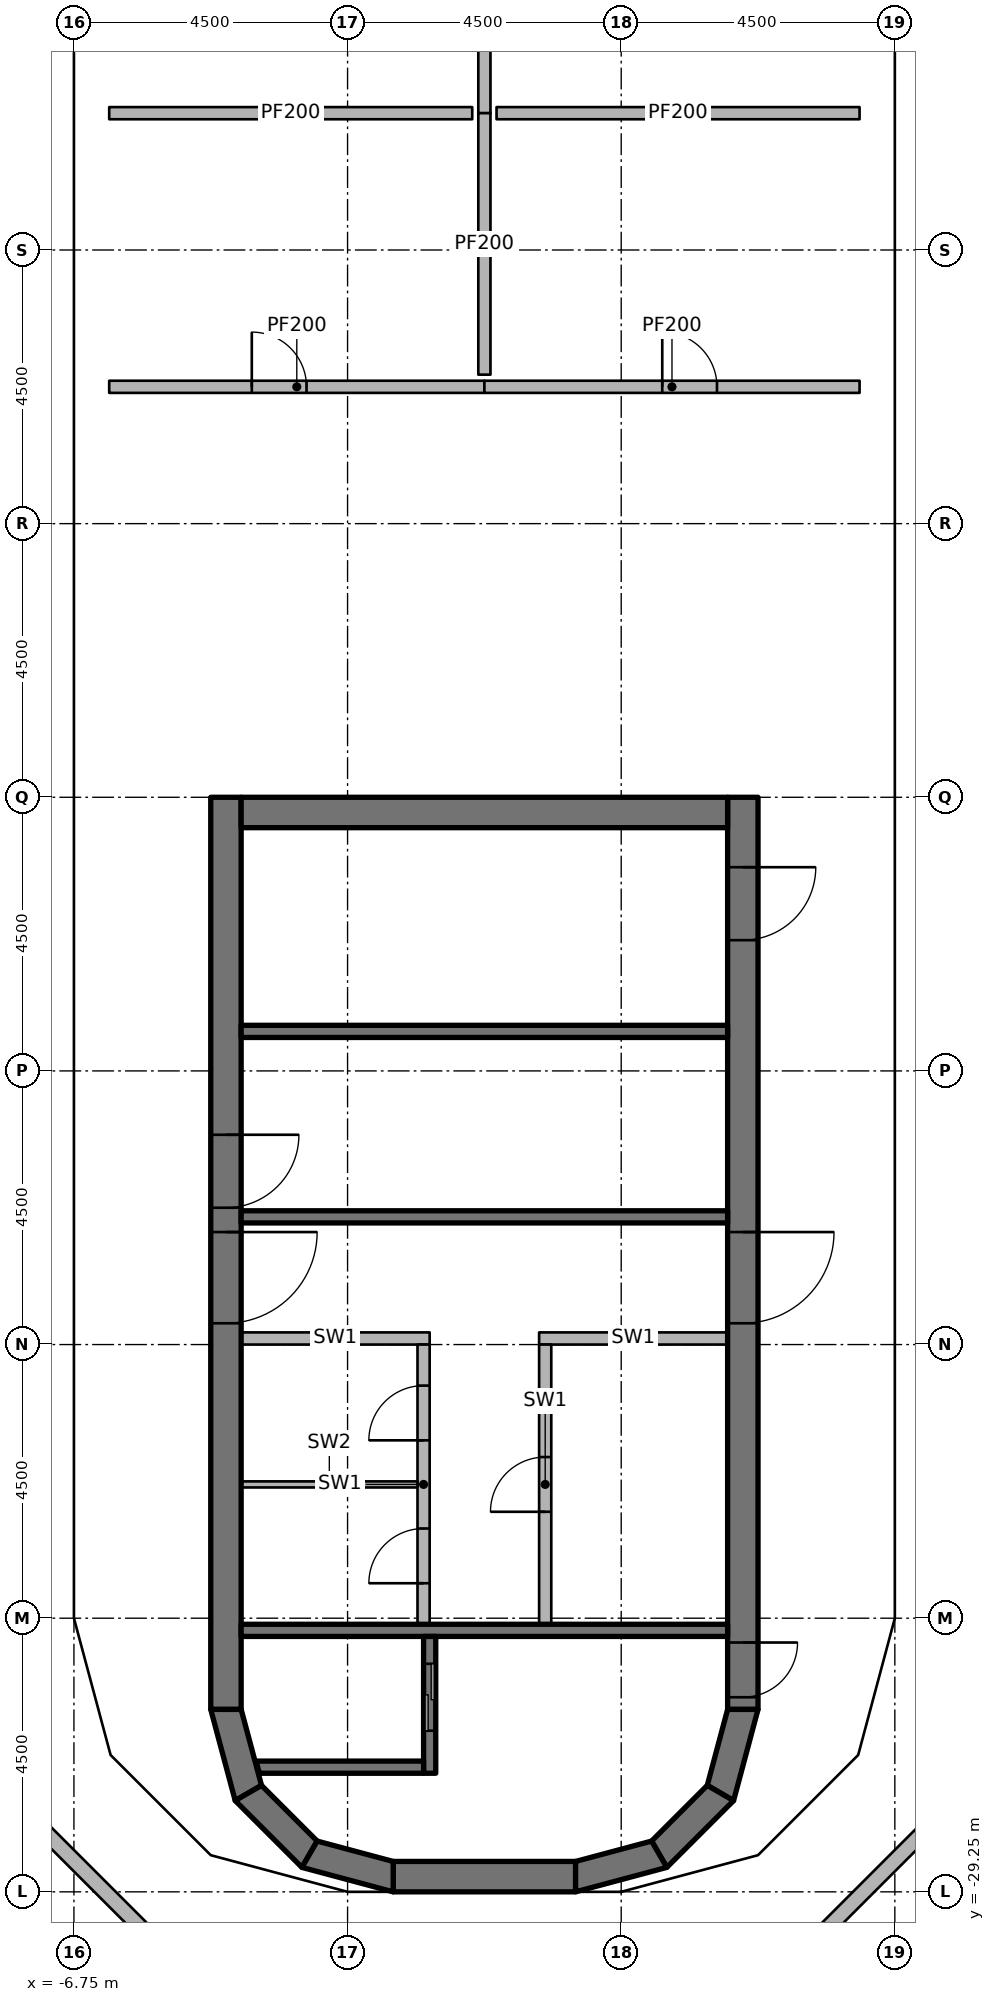
"""IFC4 building model, lengths in metres.
Left out: names, types, materials, properties, quantities, classifications, styles, units other than length and angle.
Written with IfcOpenShell. Run it as: python <this file> out.ifc"""

import sys

from ifc_helpers import new_model, si_unit, direction, frame, frame_2d, origin, origin_2d, place, context, subcontext, project, spatial, polyline, rectangle, outline, extrude, element, fill, save


model = new_model("IFC4")
c1 = context("Model", 3, precision=1e-05, world=origin(), true_north=direction((0.0, 1.0)))
c2 = subcontext(c1, "Body", "Model", "MODEL_VIEW")
j1 = project(units=[si_unit("LENGTHUNIT", "METRE"), si_unit("PLANEANGLEUNIT", "RADIAN")], contexts=[c1])
p1 = place(None, origin())
s1 = spatial("IfcSite", under=j1, at=p1, CompositionType="ELEMENT")
p2 = place(p1, origin())
s2 = spatial("IfcBuilding", under=s1, at=p2, CompositionType="ELEMENT")
p3 = place(p2, frame((0.0, 0.0, 306.0)))
s3 = spatial("IfcBuildingStorey", under=s2, at=p3, CompositionType="ELEMENT", Elevation=306.0)
for number, where, z_axis, x_axis in (
    (1, (-6.25, -24.65, 0.0), (0.0, 0.0, 1.0), (1.0, 0.0, 0.0)),
    (2, (-6.25, -20.25, 0.0), (0.0, 0.0, 1.0), (1.0, 0.0, 0.0)),
    (3, (-6.25, -15.75, 0.0), (0.0, 0.0, 1.0), (1.0, 0.0, 0.0)),
    (4, (-6.25, -10.75, 0.0), (0.0, 0.0, 1.0), (1.0, 0.0, 0.0)),
    (5, (-6.25, -6.25, 0.0), (0.0, 0.0, 1.0), (1.0, 0.0, 0.0)),
    (6, (6.25, -24.65, 0.0), (0.0, 0.0, 1.0), (1.0, 0.0, 0.0)),
    (7, (6.25, -20.25, 0.0), (0.0, 0.0, 1.0), (1.0, 0.0, 0.0)),
    (8, (6.25, -15.75, 0.0), (0.0, 0.0, 1.0), (1.0, 0.0, 0.0)),
    (9, (6.25, -10.75, 0.0), (0.0, 0.0, 1.0), (1.0, 0.0, 0.0)),
    (10, (6.25, -6.25, 0.0), (0.0, 0.0, 1.0), (1.0, 0.0, 0.0)),
):
    element("IfcColumn", number, at=place(p3, frame(where, z_axis=z_axis, x_axis=x_axis)), inside=s3, PredefinedType="COLUMN", context=c2, shape_type="SweptSolid", body=[
        extrude(rectangle(XDim=0.6, YDim=0.6, at=origin_2d()), origin(), (0.0, 0.0, 1.0), 3.45),
    ])
p4 = place(p3, frame((-4.25, -11.25, 0.0), z_axis=(0.0, 0.0, 1.0), x_axis=(0.0, -1.0, 0.0)))
e11 = element("IfcWall", 11, at=p4, inside=s3, PredefinedType="SHEAR", context=c2, shape_type="SweptSolid", body=[
    extrude(rectangle(XDim=15.0, YDim=0.5, at=frame_2d((7.5, 0.0))), origin(), (0.0, 0.0, 1.0), 3.6),
])
p5 = place(p4, frame((7.15, 0.0, 0.0)))
e12 = element("IfcOpeningElement", 12, at=p5, cuts=e11, PredefinedType="OPENING", context=c2, shape_type="SweptSolid", body=[
    extrude(rectangle(XDim=1.5, YDim=2.3, at=frame_2d((0.75, 1.15))), frame((0.0, 0.26, 0.0), z_axis=(0.0, -1.0, 0.0), x_axis=(1.0, 0.0, 0.0)), (0.0, 0.0, 1.0), 0.52),
])
p6 = place(p4, frame((5.55, 0.0, 0.0)))
e13 = element("IfcOpeningElement", 13, at=p6, cuts=e11, PredefinedType="OPENING", context=c2, shape_type="SweptSolid", body=[
    extrude(rectangle(XDim=1.2, YDim=2.1, at=frame_2d((0.6, 1.05))), frame((0.0, 0.26, 0.0), z_axis=(0.0, -1.0, 0.0), x_axis=(1.0, 0.0, 0.0)), (0.0, 0.0, 1.0), 0.52),
])
p7 = place(p3, frame((4.25, -11.25, 0.0), z_axis=(0.0, 0.0, 1.0), x_axis=(0.0, -1.0, 0.0)))
e14 = element("IfcWall", 14, at=p7, inside=s3, PredefinedType="SHEAR", context=c2, shape_type="SweptSolid", body=[
    extrude(rectangle(XDim=15.0, YDim=0.5, at=frame_2d((7.5, 0.0))), origin(), (0.0, 0.0, 1.0), 3.6),
])
p8 = place(p7, frame((7.15, 0.0, 0.0)))
e15 = element("IfcOpeningElement", 15, at=p8, cuts=e14, PredefinedType="OPENING", context=c2, shape_type="SweptSolid", body=[
    extrude(rectangle(XDim=1.5, YDim=2.3, at=frame_2d((0.75, 1.15))), frame((0.0, 0.26, 0.0), z_axis=(0.0, -1.0, 0.0), x_axis=(1.0, 0.0, 0.0)), (0.0, 0.0, 1.0), 0.52),
])
p9 = place(p7, frame((13.9, 0.0, 0.0)))
e16 = element("IfcOpeningElement", 16, at=p9, cuts=e14, PredefinedType="OPENING", context=c2, shape_type="SweptSolid", body=[
    extrude(rectangle(XDim=0.9, YDim=2.1, at=frame_2d((0.45, 1.05))), frame((0.0, 0.26, 0.0), z_axis=(0.0, -1.0, 0.0), x_axis=(1.0, 0.0, 0.0)), (0.0, 0.0, 1.0), 0.52),
])
p10 = place(p7, frame((1.15, 0.0, 0.0)))
e17 = element("IfcOpeningElement", 17, at=p10, cuts=e14, PredefinedType="OPENING", context=c2, shape_type="SweptSolid", body=[
    extrude(rectangle(XDim=1.2, YDim=2.1, at=frame_2d((0.6, 1.05))), frame((0.0, 0.26, 0.0), z_axis=(0.0, -1.0, 0.0), x_axis=(1.0, 0.0, 0.0)), (0.0, 0.0, 1.0), 0.52),
])
p11 = place(p3, frame((-4.0, -11.5, 0.0), z_axis=(0.0, 0.0, 1.0), x_axis=(1.0, 0.0, 0.0)))
e18 = element("IfcWall", 18, at=p11, inside=s3, PredefinedType="SHEAR", context=c2, shape_type="SweptSolid", body=[
    extrude(rectangle(XDim=8.0, YDim=0.5, at=frame_2d((4.0, 0.0))), origin(), (0.0, 0.0, 1.0), 3.6),
])
p12 = place(p3, frame((-1.5, -29.0, 0.0), z_axis=(0.0, 0.0, 1.0), x_axis=(1.0, 0.0, 0.0)))
e19 = element("IfcWall", 19, at=p12, inside=s3, PredefinedType="SHEAR", context=c2, shape_type="SweptSolid", body=[
    extrude(rectangle(XDim=3.0, YDim=0.5, at=frame_2d((1.5, 0.0))), origin(), (0.0, 0.0, 1.0), 3.6),
])
p13 = place(p3, origin())
e20 = element("IfcWall", 20, at=p13, inside=s3, PredefinedType="SHEAR", context=c2, shape_type="SweptSolid", body=[
    extrude(outline(polyline([(-4.5, -26.25), (-4.098, -27.75), (-3.665, -27.5), (-4.0, -26.25), (-4.5, -26.25)])), origin(), (0.0, 0.0, 1.0), 3.6),
])
p14 = place(p3, origin())
e21 = element("IfcWall", 21, at=p14, inside=s3, PredefinedType="SHEAR", context=c2, shape_type="SweptSolid", body=[
    extrude(outline(polyline([(-4.098, -27.75), (-3.0, -28.848), (-2.75, -28.415), (-3.665, -27.5), (-4.098, -27.75)])), origin(), (0.0, 0.0, 1.0), 3.6),
])
p15 = place(p3, origin())
e22 = element("IfcWall", 22, at=p15, inside=s3, PredefinedType="SHEAR", context=c2, shape_type="SweptSolid", body=[
    extrude(outline(polyline([(-3.0, -28.848), (-1.5, -29.25), (-1.5, -28.75), (-2.75, -28.415), (-3.0, -28.848)])), origin(), (0.0, 0.0, 1.0), 3.6),
])
p16 = place(p3, origin())
e23 = element("IfcWall", 23, at=p16, inside=s3, PredefinedType="SHEAR", context=c2, shape_type="SweptSolid", body=[
    extrude(outline(polyline([(4.5, -26.25), (4.098, -27.75), (3.665, -27.5), (4.0, -26.25), (4.5, -26.25)])), origin(), (0.0, 0.0, 1.0), 3.6),
])
p17 = place(p3, origin())
e24 = element("IfcWall", 24, at=p17, inside=s3, PredefinedType="SHEAR", context=c2, shape_type="SweptSolid", body=[
    extrude(outline(polyline([(4.098, -27.75), (3.0, -28.848), (2.75, -28.415), (3.665, -27.5), (4.098, -27.75)])), origin(), (0.0, 0.0, 1.0), 3.6),
])
p18 = place(p3, origin())
e25 = element("IfcWall", 25, at=p18, inside=s3, PredefinedType="SHEAR", context=c2, shape_type="SweptSolid", body=[
    extrude(outline(polyline([(3.0, -28.848), (1.5, -29.25), (1.5, -28.75), (2.75, -28.415), (3.0, -28.848)])), origin(), (0.0, 0.0, 1.0), 3.6),
])
p19 = place(p3, origin())
e26 = element("IfcWall", 26, at=p19, inside=s3, PredefinedType="PARAPET", context=c2, shape_type="SweptSolid", body=[
    extrude(outline(polyline([(-5.421, -30.243), (-7.743, -27.921), (-7.519, -27.792), (-5.292, -30.019), (-5.421, -30.243)])), origin(), (0.0, 0.0, 1.0), 1.22),
])
p20 = place(p3, origin())
e27 = element("IfcWall", 27, at=p20, inside=s3, PredefinedType="PARAPET", context=c2, shape_type="SweptSolid", body=[
    extrude(outline(polyline([(7.743, -27.921), (5.421, -30.243), (5.292, -30.019), (7.519, -27.792), (7.743, -27.921)])), origin(), (0.0, 0.0, 1.0), 1.22),
])
p21 = place(p3, frame((4.0, -24.95, 0.0), z_axis=(0.0, 0.0, 1.0), x_axis=(-1.0, 0.0, 0.0)))
e28 = element("IfcWall", 28, at=p21, inside=s3, PredefinedType="SHEAR", context=c2, shape_type="SweptSolid", body=[
    extrude(rectangle(XDim=8.0, YDim=0.2, at=frame_2d((4.0, 0.0))), origin(), (0.0, 0.0, 1.0), 3.45),
])
p22 = place(p3, frame((-0.9, -27.3, 0.0), z_axis=(0.0, 0.0, 1.0), x_axis=(0.0, 1.0, 0.0)))
e29 = element("IfcWall", 29, at=p22, inside=s3, PredefinedType="SHEAR", context=c2, shape_type="SweptSolid", body=[
    extrude(rectangle(XDim=2.25, YDim=0.2, at=frame_2d((1.125, 0.0))), origin(), (0.0, 0.0, 1.0), 3.45),
])
p23 = place(p22, frame((0.7, 0.0, 0.0)))
e30 = element("IfcOpeningElement", 30, at=p23, cuts=e29, PredefinedType="OPENING", context=c2, shape_type="SweptSolid", body=[
    extrude(rectangle(XDim=1.1, YDim=2.3, at=frame_2d((0.55, 1.15))), frame((0.0, 0.11, 0.0), z_axis=(0.0, -1.0, 0.0), x_axis=(1.0, 0.0, 0.0)), (0.0, 0.0, 1.0), 0.22),
])
p24 = place(p3, origin())
e31 = element("IfcWall", 31, at=p24, inside=s3, PredefinedType="SHEAR", context=c2, shape_type="SweptSolid", body=[
    extrude(outline(polyline([(-1.0, -27.1), (-3.755, -27.1), (-3.701, -27.3), (-1.0, -27.3), (-1.0, -27.1)])), origin(), (0.0, 0.0, 1.0), 3.45),
])
for number, where, z_axis, x_axis in (
    (32, (4.0, -18.15, 0.0), (0.0, 0.0, 1.0), (-1.0, 0.0, 0.0)),
    (33, (4.0, -15.1, 0.0), (0.0, 0.0, 1.0), (-1.0, 0.0, 0.0)),
):
    element("IfcWall", number, at=place(p3, frame(where, z_axis=z_axis, x_axis=x_axis)), inside=s3, PredefinedType="SHEAR", context=c2, shape_type="SweptSolid", body=[
        extrude(rectangle(XDim=8.0, YDim=0.2, at=frame_2d((4.0, 0.0))), origin(), (0.0, 0.0, 1.0), 3.45),
    ])
p25 = place(p3, frame((4.0, -20.15, 0.0), z_axis=(0.0, 0.0, 1.0), x_axis=(-1.0, 0.0, 0.0)))
e34 = element("IfcWall", 34, at=p25, inside=s3, PredefinedType="PARTITIONING", context=c2, shape_type="SweptSolid", body=[
    extrude(rectangle(XDim=3.1, YDim=0.2, at=frame_2d((1.55, 0.0))), origin(), (0.0, 0.0, 1.0), 3.45),
])
p26 = place(p3, frame((1.0, -24.85, 0.0), z_axis=(0.0, 0.0, 1.0), x_axis=(0.0, 1.0, 0.0)))
e35 = element("IfcWall", 35, at=p26, inside=s3, PredefinedType="PARTITIONING", context=c2, shape_type="SweptSolid", body=[
    extrude(rectangle(XDim=4.6, YDim=0.2, at=frame_2d((2.3, 0.0))), origin(), (0.0, 0.0, 1.0), 3.45),
])
p27 = place(p26, frame((1.85, 0.0, 0.0)))
e36 = element("IfcOpeningElement", 36, at=p27, cuts=e35, PredefinedType="OPENING", context=c2, shape_type="SweptSolid", body=[
    extrude(rectangle(XDim=0.9, YDim=2.1, at=frame_2d((0.45, 1.05))), frame((0.0, 0.11, 0.0), z_axis=(0.0, -1.0, 0.0), x_axis=(1.0, 0.0, 0.0)), (0.0, 0.0, 1.0), 0.22),
])
p28 = place(p3, frame((-0.9, -20.15, 0.0), z_axis=(0.0, 0.0, 1.0), x_axis=(-1.0, 0.0, 0.0)))
e37 = element("IfcWall", 37, at=p28, inside=s3, PredefinedType="PARTITIONING", context=c2, shape_type="SweptSolid", body=[
    extrude(rectangle(XDim=3.1, YDim=0.2, at=frame_2d((1.55, 0.0))), origin(), (0.0, 0.0, 1.0), 3.45),
])
p29 = place(p3, frame((-1.0, -24.85, 0.0), z_axis=(0.0, 0.0, 1.0), x_axis=(0.0, 1.0, 0.0)))
e38 = element("IfcWall", 38, at=p29, inside=s3, PredefinedType="PARTITIONING", context=c2, shape_type="SweptSolid", body=[
    extrude(rectangle(XDim=4.6, YDim=0.2, at=frame_2d((2.3, 0.0))), origin(), (0.0, 0.0, 1.0), 3.45),
])
p30 = place(p29, frame((0.675, 0.0, 0.0)))
e39 = element("IfcOpeningElement", 39, at=p30, cuts=e38, PredefinedType="OPENING", context=c2, shape_type="SweptSolid", body=[
    extrude(rectangle(XDim=0.9, YDim=2.1, at=frame_2d((0.45, 1.05))), frame((0.0, 0.11, 0.0), z_axis=(0.0, -1.0, 0.0), x_axis=(1.0, 0.0, 0.0)), (0.0, 0.0, 1.0), 0.22),
])
p31 = place(p29, frame((3.025, 0.0, 0.0)))
e40 = element("IfcOpeningElement", 40, at=p31, cuts=e38, PredefinedType="OPENING", context=c2, shape_type="SweptSolid", body=[
    extrude(rectangle(XDim=0.9, YDim=2.1, at=frame_2d((0.45, 1.05))), frame((0.0, 0.11, 0.0), z_axis=(0.0, -1.0, 0.0), x_axis=(1.0, 0.0, 0.0)), (0.0, 0.0, 1.0), 0.22),
])
p32 = place(p3, frame((-1.1, -22.55, 0.0), z_axis=(0.0, 0.0, 1.0), x_axis=(-1.0, 0.0, 0.0)))
e41 = element("IfcWall", 41, at=p32, inside=s3, PredefinedType="PARTITIONING", context=c2, shape_type="SweptSolid", body=[
    extrude(rectangle(XDim=2.9, YDim=0.1, at=frame_2d((1.45, 0.0))), origin(), (0.0, 0.0, 1.0), 3.45),
])
p33 = place(p3, frame((-6.17, -4.5, 0.0), z_axis=(0.0, 0.0, 1.0), x_axis=(1.0, 0.0, 0.0)))
e42 = element("IfcWall", 42, at=p33, inside=s3, PredefinedType="PARTITIONING", context=c2, shape_type="SweptSolid", body=[
    extrude(rectangle(XDim=6.17, YDim=0.2, at=frame_2d((3.085, 0.0))), origin(), (0.0, 0.0, 1.0), 3.45),
])
p34 = place(p33, frame((2.345, 0.0, 0.0)))
e43 = element("IfcOpeningElement", 43, at=p34, cuts=e42, PredefinedType="OPENING", context=c2, shape_type="SweptSolid", body=[
    extrude(rectangle(XDim=0.9, YDim=2.1, at=frame_2d((0.45, 1.05))), frame((0.0, 0.11, 0.0), z_axis=(0.0, -1.0, 0.0), x_axis=(1.0, 0.0, 0.0)), (0.0, 0.0, 1.0), 0.22),
])
p35 = place(p3, frame((0.0, -4.5, 0.0), z_axis=(0.0, 0.0, 1.0), x_axis=(1.0, 0.0, 0.0)))
e44 = element("IfcWall", 44, at=p35, inside=s3, PredefinedType="PARTITIONING", context=c2, shape_type="SweptSolid", body=[
    extrude(rectangle(XDim=6.17, YDim=0.2, at=frame_2d((3.085, 0.0))), origin(), (0.0, 0.0, 1.0), 3.45),
])
p36 = place(p35, frame((2.925, 0.0, 0.0)))
e45 = element("IfcOpeningElement", 45, at=p36, cuts=e44, PredefinedType="OPENING", context=c2, shape_type="SweptSolid", body=[
    extrude(rectangle(XDim=0.9, YDim=2.1, at=frame_2d((0.45, 1.05))), frame((0.0, 0.11, 0.0), z_axis=(0.0, -1.0, 0.0), x_axis=(1.0, 0.0, 0.0)), (0.0, 0.0, 1.0), 0.22),
])
p37 = place(p3, frame((0.0, 4.3, 0.0), z_axis=(0.0, 0.0, 1.0), x_axis=(0.0, -1.0, 0.0)))
e46 = element("IfcWall", 46, at=p37, inside=s3, PredefinedType="PARTITIONING", context=c2, shape_type="SweptSolid", body=[
    extrude(rectangle(XDim=4.3, YDim=0.2, at=frame_2d((2.15, 0.0))), origin(), (0.0, 0.0, 1.0), 2.828),
])
for number, where, z_axis, x_axis in (
    (47, (-0.2, 0.0, 0.0), (0.0, 0.0, 1.0), (-1.0, 0.0, 0.0)),
    (48, (6.17, 0.0, 0.0), (0.0, 0.0, 1.0), (-1.0, 0.0, 0.0)),
):
    element("IfcWall", number, at=place(p3, frame(where, z_axis=z_axis, x_axis=x_axis)), inside=s3, PredefinedType="PARTITIONING", context=c2, shape_type="SweptSolid", body=[
        extrude(rectangle(XDim=5.97, YDim=0.2, at=frame_2d((2.985, 0.0))), origin(), (0.0, 0.0, 1.0), 3.45),
    ])
p38 = place(p3, frame((0.0, 0.0, 0.0), z_axis=(0.0, 0.0, 1.0), x_axis=(0.0, -1.0, 0.0)))
e49 = element("IfcWall", 49, at=p38, inside=s3, PredefinedType="PARTITIONING", context=c2, shape_type="SweptSolid", body=[
    extrude(rectangle(XDim=4.3, YDim=0.2, at=frame_2d((2.15, 0.0))), origin(), (0.0, 0.0, 1.0), 2.828),
])
p39 = place(p8, origin())
e50 = element("IfcDoor", 50, at=p39, inside=s3, OperationType="DOUBLE_DOOR_SINGLE_SWING", PredefinedType="DOOR", context=c2, shape_type="SweptSolid", body=[
    extrude(rectangle(XDim=1.5, YDim=2.3, at=frame_2d((0.75, 1.15))), frame((0.0, 0.025, 0.0), z_axis=(0.0, -1.0, 0.0), x_axis=(1.0, 0.0, 0.0)), (0.0, 0.0, 1.0), 0.05),
])
fill(e15, e50)
p40 = place(p5, origin())
e51 = element("IfcDoor", 51, at=p40, inside=s3, OperationType="DOUBLE_DOOR_SINGLE_SWING", PredefinedType="DOOR", context=c2, shape_type="SweptSolid", body=[
    extrude(rectangle(XDim=1.5, YDim=2.3, at=frame_2d((0.75, 1.15))), frame((0.0, 0.025, 0.0), z_axis=(0.0, -1.0, 0.0), x_axis=(1.0, 0.0, 0.0)), (0.0, 0.0, 1.0), 0.05),
])
fill(e12, e51)
p41 = place(p9, origin())
e52 = element("IfcDoor", 52, at=p41, inside=s3, OperationType="SINGLE_SWING_LEFT", PredefinedType="DOOR", context=c2, shape_type="SweptSolid", body=[
    extrude(rectangle(XDim=0.9, YDim=2.1, at=frame_2d((0.45, 1.05))), frame((0.0, 0.025, 0.0), z_axis=(0.0, -1.0, 0.0), x_axis=(1.0, 0.0, 0.0)), (0.0, 0.0, 1.0), 0.05),
])
fill(e16, e52)
p42 = place(p6, origin())
e53 = element("IfcDoor", 53, at=p42, inside=s3, OperationType="SINGLE_SWING_RIGHT", PredefinedType="DOOR", context=c2, shape_type="SweptSolid", body=[
    extrude(rectangle(XDim=1.2, YDim=2.1, at=frame_2d((0.6, 1.05))), frame((0.0, 0.025, 0.0), z_axis=(0.0, -1.0, 0.0), x_axis=(1.0, 0.0, 0.0)), (0.0, 0.0, 1.0), 0.05),
])
fill(e13, e53)
p43 = place(p10, origin())
e54 = element("IfcDoor", 54, at=p43, inside=s3, OperationType="SINGLE_SWING_RIGHT", PredefinedType="DOOR", context=c2, shape_type="SweptSolid", body=[
    extrude(rectangle(XDim=1.2, YDim=2.1, at=frame_2d((0.6, 1.05))), frame((0.0, 0.025, 0.0), z_axis=(0.0, -1.0, 0.0), x_axis=(1.0, 0.0, 0.0)), (0.0, 0.0, 1.0), 0.05),
])
fill(e17, e54)
p44 = place(p23, origin())
e55 = element("IfcDoor", 55, at=p44, inside=s3, OperationType="DOUBLE_DOOR_SLIDING", PredefinedType="DOOR", context=c2, shape_type="SweptSolid", body=[
    extrude(rectangle(XDim=1.1, YDim=2.3, at=frame_2d((0.55, 1.15))), frame((0.0, 0.025, 0.0), z_axis=(0.0, -1.0, 0.0), x_axis=(1.0, 0.0, 0.0)), (0.0, 0.0, 1.0), 0.05),
])
fill(e30, e55)
p45 = place(p27, origin())
e56 = element("IfcDoor", 56, at=p45, inside=s3, OperationType="SINGLE_SWING_LEFT", PredefinedType="DOOR", context=c2, shape_type="SweptSolid", body=[
    extrude(rectangle(XDim=0.9, YDim=2.1, at=frame_2d((0.45, 1.05))), frame((0.0, 0.025, 0.0), z_axis=(0.0, -1.0, 0.0), x_axis=(1.0, 0.0, 0.0)), (0.0, 0.0, 1.0), 0.05),
])
fill(e36, e56)
p46 = place(p30, origin())
e57 = element("IfcDoor", 57, at=p46, inside=s3, OperationType="SINGLE_SWING_RIGHT", PredefinedType="DOOR", context=c2, shape_type="SweptSolid", body=[
    extrude(rectangle(XDim=0.9, YDim=2.1, at=frame_2d((0.45, 1.05))), frame((0.0, 0.025, 0.0), z_axis=(0.0, -1.0, 0.0), x_axis=(1.0, 0.0, 0.0)), (0.0, 0.0, 1.0), 0.05),
])
fill(e39, e57)
p47 = place(p31, origin())
e58 = element("IfcDoor", 58, at=p47, inside=s3, OperationType="SINGLE_SWING_LEFT", PredefinedType="DOOR", context=c2, shape_type="SweptSolid", body=[
    extrude(rectangle(XDim=0.9, YDim=2.1, at=frame_2d((0.45, 1.05))), frame((0.0, 0.025, 0.0), z_axis=(0.0, -1.0, 0.0), x_axis=(1.0, 0.0, 0.0)), (0.0, 0.0, 1.0), 0.05),
])
fill(e40, e58)
p48 = place(p34, origin())
e59 = element("IfcDoor", 59, at=p48, inside=s3, OperationType="SINGLE_SWING_LEFT", PredefinedType="DOOR", context=c2, shape_type="SweptSolid", body=[
    extrude(rectangle(XDim=0.9, YDim=2.1, at=frame_2d((0.45, 1.05))), frame((0.0, 0.025, 0.0), z_axis=(0.0, -1.0, 0.0), x_axis=(1.0, 0.0, 0.0)), (0.0, 0.0, 1.0), 0.05),
])
fill(e43, e59)
p49 = place(p36, origin())
e60 = element("IfcDoor", 60, at=p49, inside=s3, OperationType="SINGLE_SWING_LEFT", PredefinedType="DOOR", context=c2, shape_type="SweptSolid", body=[
    extrude(rectangle(XDim=0.9, YDim=2.1, at=frame_2d((0.45, 1.05))), frame((0.0, 0.025, 0.0), z_axis=(0.0, -1.0, 0.0), x_axis=(1.0, 0.0, 0.0)), (0.0, 0.0, 1.0), 0.05),
])
fill(e45, e60)
save(model, sys.argv[1])
